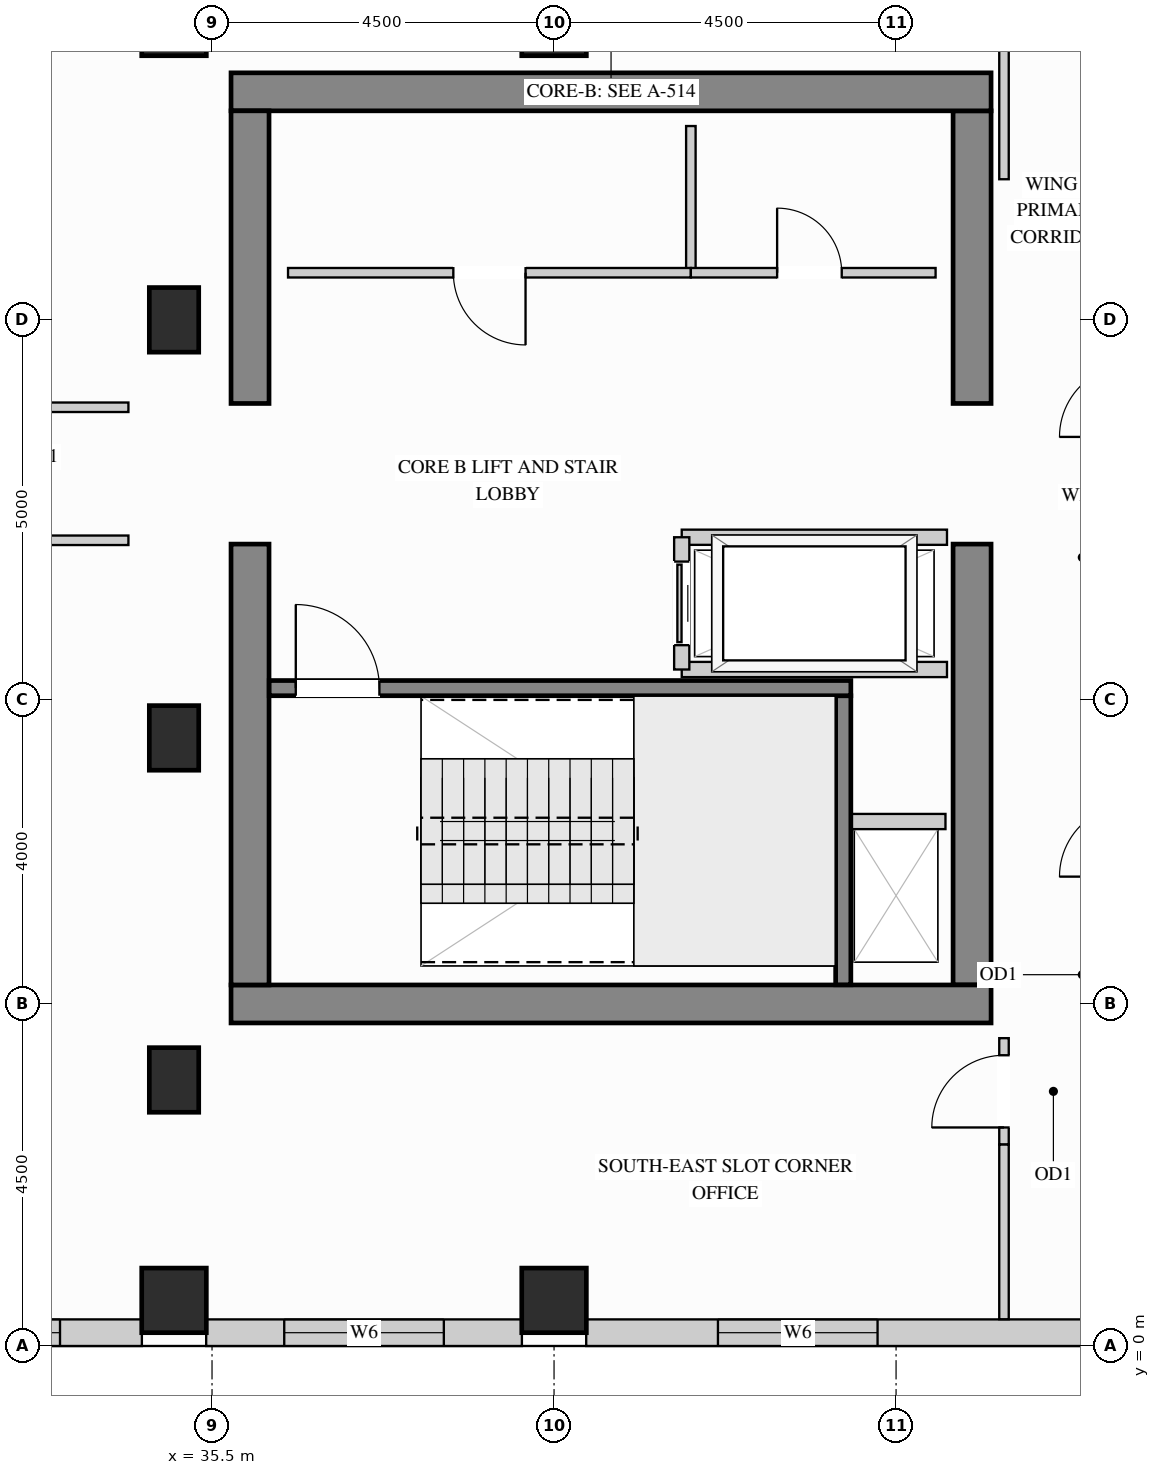
"""IFC4 building model, lengths in metres.
Left out: names, types, materials, properties, quantities, classifications, styles, units other than length and angle.
Written with IfcOpenShell. Run it as: python <this file> out.ifc"""

import sys

from ifc_helpers import new_model, si_unit, direction, frame, frame_2d, origin, origin_2d, place, context, subcontext, project, spatial, rectangle, extrude, source, transform, mapped, element, fill, save


model = new_model("IFC4")
c1 = context("Model", 3, precision=1e-05, world=origin(), true_north=direction((0.0, 1.0)))
c2 = subcontext(c1, "Body", "Model", "MODEL_VIEW")
j1 = project(units=[si_unit("LENGTHUNIT", "METRE"), si_unit("PLANEANGLEUNIT", "RADIAN")], contexts=[c1])
p1 = place(None, origin())
s1 = spatial("IfcSite", under=j1, at=p1, CompositionType="ELEMENT")
p2 = place(p1, origin())
s2 = spatial("IfcBuilding", under=s1, at=p2, CompositionType="ELEMENT")
p3 = place(p2, frame((0.0, 0.0, 252.0)))
s3 = spatial("IfcBuildingStorey", under=s2, at=p3, CompositionType="ELEMENT", Elevation=252.0)
m1 = source(origin(), c2, "Body", "SweptSolid", [
    extrude(rectangle(XDim=0.65, YDim=0.85, at=origin_2d()), origin(), (0.0, 0.0, 1.0), 3.4),
])
for number, where, z_axis, x_axis in (
    (1, (35.0, 13.5, 0.0), (0.0, 0.0, 1.0), (1.0, 0.0, 0.0)),
    (2, (35.0, 3.5, 0.0), (0.0, 0.0, 1.0), (1.0, 0.0, 0.0)),
    (3, (35.0, 8.0, 0.0), (0.0, 0.0, 1.0), (1.0, 0.0, 0.0)),
):
    element("IfcColumn", number, at=place(p3, frame(where, z_axis=z_axis, x_axis=x_axis)), inside=s3, PredefinedType="COLUMN", context=c2, shape_type="MappedRepresentation", body=[
        mapped(m1, transform((0.0, 0.0, 0.0), x_axis=(1.0, 0.0, 0.0), y_axis=(0.0, 1.0, 0.0), z_axis=(0.0, 0.0, 1.0))),
    ])
m2 = source(origin(), c2, "Body", "SweptSolid", [
    extrude(rectangle(XDim=0.85, YDim=0.85, at=origin_2d()), origin(), (0.0, 0.0, 1.0), 3.4),
])
for number, where, z_axis, x_axis in (
    (4, (35.0, 17.4, 0.0), (0.0, 0.0, 1.0), (1.0, 0.0, 0.0)),
    (5, (40.0, 17.4, 0.0), (0.0, 0.0, 1.0), (1.0, 0.0, 0.0)),
    (6, (35.0, 0.6, 0.0), (0.0, 0.0, 1.0), (1.0, 0.0, 0.0)),
    (7, (40.0, 0.6, 0.0), (0.0, 0.0, 1.0), (1.0, 0.0, 0.0)),
):
    element("IfcColumn", number, at=place(p3, frame(where, z_axis=z_axis, x_axis=x_axis)), inside=s3, PredefinedType="COLUMN", context=c2, shape_type="MappedRepresentation", body=[
        mapped(m2, transform((0.0, 0.0, 0.0), x_axis=(1.0, 0.0, 0.0), y_axis=(0.0, 1.0, 0.0), z_axis=(0.0, 0.0, 1.0))),
    ])
m3 = source(origin(), c2, "Body", "SweptSolid", [
    extrude(rectangle(XDim=5.8, YDim=0.5, at=frame_2d((2.9, 0.0))), origin(), (0.0, 0.0, 1.0), 3.4),
])
p4 = place(p3, frame((45.5, 4.75, 0.0), z_axis=(0.0, 0.0, 1.0), x_axis=(0.0, 1.0, 0.0)))
e8 = element("IfcWall", 8, at=p4, inside=s3, PredefinedType="SHEAR", context=c2, shape_type="MappedRepresentation", body=[
    mapped(m3, transform((0.0, 0.0, 0.0), x_axis=(1.0, 0.0, 0.0), y_axis=(0.0, 1.0, 0.0), z_axis=(0.0, 0.0, 1.0))),
])
m4 = source(origin(), c2, "Body", "SweptSolid", [
    extrude(rectangle(XDim=3.85, YDim=0.5, at=frame_2d((1.925, 0.0))), origin(), (0.0, 0.0, 1.0), 3.4),
])
p5 = place(p3, frame((45.5, 12.4, 0.0), z_axis=(0.0, 0.0, 1.0), x_axis=(0.0, 1.0, 0.0)))
e9 = element("IfcWall", 9, at=p5, inside=s3, PredefinedType="SHEAR", context=c2, shape_type="MappedRepresentation", body=[
    mapped(m4, transform((0.0, 0.0, 0.0), x_axis=(1.0, 0.0, 0.0), y_axis=(0.0, 1.0, 0.0), z_axis=(0.0, 0.0, 1.0))),
])
m5 = source(origin(), c2, "Body", "SweptSolid", [
    extrude(rectangle(XDim=10.0, YDim=0.5, at=frame_2d((5.0, 0.0))), origin(), (0.0, 0.0, 1.0), 3.4),
])
for number, where, z_axis, x_axis in (
    (10, (35.75, 16.5, 0.0), (0.0, 0.0, 1.0), (1.0, 0.0, 0.0)),
    (11, (35.75, 4.5, 0.0), (0.0, 0.0, 1.0), (1.0, 0.0, 0.0)),
):
    element("IfcWall", number, at=place(p3, frame(where, z_axis=z_axis, x_axis=x_axis)), inside=s3, PredefinedType="SHEAR", context=c2, shape_type="MappedRepresentation", body=[
        mapped(m5, transform((0.0, 0.0, 0.0), x_axis=(1.0, 0.0, 0.0), y_axis=(0.0, 1.0, 0.0), z_axis=(0.0, 0.0, 1.0))),
    ])
p6 = place(p3, frame((36.0, 4.75, 0.0), z_axis=(0.0, 0.0, 1.0), x_axis=(0.0, 1.0, 0.0)))
e12 = element("IfcWall", 12, at=p6, inside=s3, PredefinedType="SHEAR", context=c2, shape_type="MappedRepresentation", body=[
    mapped(m3, transform((0.0, 0.0, 0.0), x_axis=(1.0, 0.0, 0.0), y_axis=(0.0, 1.0, 0.0), z_axis=(0.0, 0.0, 1.0))),
])
p7 = place(p3, frame((36.0, 12.4, 0.0), z_axis=(0.0, 0.0, 1.0), x_axis=(0.0, 1.0, 0.0)))
e13 = element("IfcWall", 13, at=p7, inside=s3, PredefinedType="SHEAR", context=c2, shape_type="MappedRepresentation", body=[
    mapped(m4, transform((0.0, 0.0, 0.0), x_axis=(1.0, 0.0, 0.0), y_axis=(0.0, 1.0, 0.0), z_axis=(0.0, 0.0, 1.0))),
])
p8 = place(p3, frame((30.923, 0.175, 0.0), z_axis=(0.0, 0.0, 1.0), x_axis=(1.0, 0.0, 0.0)))
e14 = element("IfcWall", 14, at=p8, inside=s3, PredefinedType="SOLIDWALL", context=c2, shape_type="SweptSolid", body=[
    extrude(rectangle(XDim=3.654, YDim=0.35, at=frame_2d((1.827, 0.0))), origin(), (0.0, 0.0, 1.0), 3.385),
])
p9 = place(p8, frame((1.077, 0.0, 0.78)))
e15 = element("IfcOpeningElement", 15, at=p9, cuts=e14, PredefinedType="OPENING", context=c2, shape_type="SweptSolid", body=[
    extrude(rectangle(XDim=1.5, YDim=2.0, at=frame_2d((0.75, 1.0))), frame((0.0, 0.185, 0.0), z_axis=(0.0, -1.0, 0.0), x_axis=(1.0, 0.0, 0.0)), (0.0, 0.0, 1.0), 0.37),
])
p10 = place(p3, frame((35.423, 0.175, 0.0), z_axis=(0.0, 0.0, 1.0), x_axis=(1.0, 0.0, 0.0)))
e16 = element("IfcWall", 16, at=p10, inside=s3, PredefinedType="SOLIDWALL", context=c2, shape_type="SweptSolid", body=[
    extrude(rectangle(XDim=4.154, YDim=0.35, at=frame_2d((2.077, 0.0))), origin(), (0.0, 0.0, 1.0), 3.385),
])
p11 = place(p10, frame((1.027, 0.0, 0.78)))
e17 = element("IfcOpeningElement", 17, at=p11, cuts=e16, PredefinedType="OPENING", context=c2, shape_type="SweptSolid", body=[
    extrude(rectangle(XDim=2.1, YDim=2.25, at=frame_2d((1.05, 1.125))), frame((0.0, 0.185, 0.0), z_axis=(0.0, -1.0, 0.0), x_axis=(1.0, 0.0, 0.0)), (0.0, 0.0, 1.0), 0.37),
])
p12 = place(p3, frame((40.423, 0.175, 0.0), z_axis=(0.0, 0.0, 1.0), x_axis=(1.0, 0.0, 0.0)))
e18 = element("IfcWall", 18, at=p12, inside=s3, PredefinedType="SOLIDWALL", context=c2, shape_type="SweptSolid", body=[
    extrude(rectangle(XDim=7.077, YDim=0.35, at=frame_2d((3.539, 0.0))), origin(), (0.0, 0.0, 1.0), 3.385),
])
p13 = place(p12, frame((1.733, 0.0, 0.78)))
e19 = element("IfcOpeningElement", 19, at=p13, cuts=e18, PredefinedType="OPENING", context=c2, shape_type="SweptSolid", body=[
    extrude(rectangle(XDim=2.1, YDim=2.25, at=frame_2d((1.05, 1.125))), frame((0.0, 0.185, 0.0), z_axis=(0.0, -1.0, 0.0), x_axis=(1.0, 0.0, 0.0)), (0.0, 0.0, 1.0), 0.37),
])
m6 = source(origin(), c2, "Body", "SweptSolid", [
    extrude(rectangle(XDim=1.93, YDim=0.125, at=frame_2d((0.965, 0.0))), origin(), (0.0, 0.0, 1.0), 3.385),
])
p14 = place(p3, frame((41.8, 14.12, 0.0), z_axis=(0.0, 0.0, 1.0), x_axis=(0.0, 1.0, 0.0)))
e20 = element("IfcWall", 20, at=p14, inside=s3, PredefinedType="PARTITIONING", context=c2, shape_type="MappedRepresentation", body=[
    mapped(m6, transform((0.0, 0.0, 0.0), x_axis=(1.0, 0.0, 0.0), y_axis=(0.0, 1.0, 0.0), z_axis=(0.0, 0.0, 1.0))),
])
p15 = place(p3, frame((36.5, 14.12, 0.0), z_axis=(0.0, 0.0, 1.0), x_axis=(1.0, 0.0, 0.0)))
e21 = element("IfcWall", 21, at=p15, inside=s3, PredefinedType="PARTITIONING", context=c2, shape_type="SweptSolid", body=[
    extrude(rectangle(XDim=5.3, YDim=0.125, at=frame_2d((2.65, 0.0))), origin(), (0.0, 0.0, 1.0), 3.385),
])
p16 = place(p15, frame((2.175, 0.0, 0.0)))
e22 = element("IfcOpeningElement", 22, at=p16, cuts=e21, PredefinedType="OPENING", context=c2, shape_type="SweptSolid", body=[
    extrude(rectangle(XDim=0.95, YDim=2.15, at=frame_2d((0.475, 1.075))), frame((0.0, 0.073, 0.0), z_axis=(0.0, -1.0, 0.0), x_axis=(1.0, 0.0, 0.0)), (0.0, 0.0, 1.0), 0.145),
])
p17 = place(p3, frame((41.8, 14.12, 0.0), z_axis=(0.0, 0.0, 1.0), x_axis=(1.0, 0.0, 0.0)))
e23 = element("IfcWall", 23, at=p17, inside=s3, PredefinedType="PARTITIONING", context=c2, shape_type="SweptSolid", body=[
    extrude(rectangle(XDim=3.22, YDim=0.125, at=frame_2d((1.61, 0.0))), origin(), (0.0, 0.0, 1.0), 3.385),
])
p18 = place(p17, frame((1.135, 0.0, 0.0)))
e24 = element("IfcOpeningElement", 24, at=p18, cuts=e23, PredefinedType="OPENING", context=c2, shape_type="SweptSolid", body=[
    extrude(rectangle(XDim=0.85, YDim=2.1, at=frame_2d((0.425, 1.05))), frame((0.0, 0.073, 0.0), z_axis=(0.0, -1.0, 0.0), x_axis=(1.0, 0.0, 0.0)), (0.0, 0.0, 1.0), 0.145),
])
m7 = source(origin(), c2, "Body", "SweptSolid", [
    extrude(rectangle(XDim=2.298, YDim=0.125, at=frame_2d((1.149, 0.0))), origin(), (0.0, 0.0, 1.0), 3.385),
])
p19 = place(p3, frame((45.92, 15.35, 0.0), z_axis=(0.0, 0.0, 1.0), x_axis=(0.0, 1.0, 0.0)))
e25 = element("IfcWall", 25, at=p19, inside=s3, PredefinedType="PARTITIONING", context=c2, shape_type="MappedRepresentation", body=[
    mapped(m7, transform((0.0, 0.0, 0.0), x_axis=(1.0, 0.0, 0.0), y_axis=(0.0, 1.0, 0.0), z_axis=(0.0, 0.0, 1.0))),
])
p20 = place(p3, frame((45.92, 2.65, 0.0), z_axis=(0.0, 0.0, 1.0), x_axis=(0.0, 1.0, 0.0)))
e26 = element("IfcWall", 26, at=p20, inside=s3, PredefinedType="PARTITIONING", context=c2, shape_type="SweptSolid", body=[
    extrude(rectangle(XDim=1.4, YDim=0.125, at=frame_2d((0.7, 0.0))), origin(), (0.0, 0.0, 1.0), 3.385),
])
p21 = place(p20, frame((0.225, 0.0, 0.0)))
e27 = element("IfcOpeningElement", 27, at=p21, cuts=e26, PredefinedType="OPENING", context=c2, shape_type="SweptSolid", body=[
    extrude(rectangle(XDim=0.95, YDim=2.15, at=frame_2d((0.475, 1.075))), frame((0.0, 0.073, 0.0), z_axis=(0.0, -1.0, 0.0), x_axis=(1.0, 0.0, 0.0)), (0.0, 0.0, 1.0), 0.145),
])
p22 = place(p3, frame((45.92, 0.352, 0.0), z_axis=(0.0, 0.0, 1.0), x_axis=(0.0, 1.0, 0.0)))
e28 = element("IfcWall", 28, at=p22, inside=s3, PredefinedType="PARTITIONING", context=c2, shape_type="MappedRepresentation", body=[
    mapped(m7, transform((0.0, 0.0, 0.0), x_axis=(1.0, 0.0, 0.0), y_axis=(0.0, 1.0, 0.0), z_axis=(0.0, 0.0, 1.0))),
])
p23 = place(p3, frame((29.85, 12.35, 0.0), z_axis=(0.0, 0.0, 1.0), x_axis=(1.0, 0.0, 0.0)))
e29 = element("IfcWall", 29, at=p23, inside=s3, PredefinedType="PARTITIONING", context=c2, shape_type="SweptSolid", body=[
    extrude(rectangle(XDim=4.55, YDim=0.125, at=frame_2d((2.275, 0.0))), origin(), (0.0, 0.0, 1.0), 3.385),
])
p24 = place(p23, frame((1.8, 0.0, 0.0)))
e30 = element("IfcOpeningElement", 30, at=p24, cuts=e29, PredefinedType="OPENING", context=c2, shape_type="SweptSolid", body=[
    extrude(rectangle(XDim=0.95, YDim=2.15, at=frame_2d((0.475, 1.075))), frame((0.0, 0.073, 0.0), z_axis=(0.0, -1.0, 0.0), x_axis=(1.0, 0.0, 0.0)), (0.0, 0.0, 1.0), 0.145),
])
p25 = place(p3, frame((29.85, 10.6, 0.0), z_axis=(0.0, 0.0, 1.0), x_axis=(1.0, 0.0, 0.0)))
e31 = element("IfcWall", 31, at=p25, inside=s3, PredefinedType="PARTITIONING", context=c2, shape_type="SweptSolid", body=[
    extrude(rectangle(XDim=4.55, YDim=0.125, at=frame_2d((2.275, 0.0))), origin(), (0.0, 0.0, 1.0), 3.385),
])
p26 = place(p25, frame((1.8, 0.0, 0.0)))
e32 = element("IfcOpeningElement", 32, at=p26, cuts=e31, PredefinedType="OPENING", context=c2, shape_type="SweptSolid", body=[
    extrude(rectangle(XDim=0.95, YDim=2.15, at=frame_2d((0.475, 1.075))), frame((0.0, 0.073, 0.0), z_axis=(0.0, -1.0, 0.0), x_axis=(1.0, 0.0, 0.0)), (0.0, 0.0, 1.0), 0.145),
])
m8 = source(origin(), c2, "Body", "SweptSolid", [
    extrude(rectangle(XDim=1.3, YDim=0.2, at=frame_2d((0.65, 0.0))), origin(), (0.0, 0.0, 1.0), 3.385),
])
p27 = place(p3, frame((43.85, 6.9, 0.0), z_axis=(0.0, 0.0, 1.0), x_axis=(1.0, 0.0, 0.0)))
e33 = element("IfcWall", 33, at=p27, inside=s3, PredefinedType="PARTITIONING", context=c2, shape_type="MappedRepresentation", body=[
    mapped(m8, transform((0.0, 0.0, 0.0), x_axis=(1.0, 0.0, 0.0), y_axis=(0.0, 1.0, 0.0), z_axis=(0.0, 0.0, 1.0))),
])
m9 = source(origin(), c2, "Body", "SweptSolid", [
    extrude(rectangle(XDim=3.49, YDim=0.2, at=frame_2d((1.745, 0.0))), origin(), (0.0, 0.0, 1.0), 3.385),
])
for number, where, z_axis, x_axis in (
    (34, (41.68, 10.64, 0.0), (0.0, 0.0, 1.0), (1.0, 0.0, 0.0)),
    (35, (41.68, 8.9, 0.0), (0.0, 0.0, 1.0), (1.0, 0.0, 0.0)),
):
    element("IfcWall", number, at=place(p3, frame(where, z_axis=z_axis, x_axis=x_axis)), inside=s3, PredefinedType="PARTITIONING", context=c2, shape_type="MappedRepresentation", body=[
        mapped(m9, transform((0.0, 0.0, 0.0), x_axis=(1.0, 0.0, 0.0), y_axis=(0.0, 1.0, 0.0), z_axis=(0.0, 0.0, 1.0))),
    ])
p28 = place(p3, frame((41.68, 8.9, 0.0), z_axis=(0.0, 0.0, 1.0), x_axis=(0.0, 1.0, 0.0)))
e36 = element("IfcWall", 36, at=p28, inside=s3, PredefinedType="PARTITIONING", context=c2, shape_type="SweptSolid", body=[
    extrude(rectangle(XDim=1.74, YDim=0.2, at=frame_2d((0.87, 0.0))), origin(), (0.0, 0.0, 1.0), 3.385),
])
p29 = place(p28, frame((0.32, 0.0, 0.0)))
e37 = element("IfcOpeningElement", 37, at=p29, cuts=e36, PredefinedType="OPENING", context=c2, shape_type="SweptSolid", body=[
    extrude(rectangle(XDim=1.1, YDim=2.2, at=frame_2d((0.55, 1.1))), frame((0.0, 0.11, 0.0), z_axis=(0.0, -1.0, 0.0), x_axis=(1.0, 0.0, 0.0)), (0.0, 0.0, 1.0), 0.22),
])
m10 = source(origin(), c2, "Body", "SweptSolid", [
    extrude(rectangle(XDim=3.803, YDim=0.2, at=frame_2d((1.901, 0.0))), origin(), (0.0, 0.0, 1.0), 3.4),
])
p30 = place(p3, frame((43.805, 4.752, 0.0), z_axis=(0.0, 0.0, 1.0), x_axis=(0.0, 1.0, 0.0)))
e38 = element("IfcWall", 38, at=p30, inside=s3, PredefinedType="SHEAR", context=c2, shape_type="MappedRepresentation", body=[
    mapped(m10, transform((0.0, 0.0, 0.0), x_axis=(1.0, 0.0, 0.0), y_axis=(0.0, 1.0, 0.0), z_axis=(0.0, 0.0, 1.0))),
])
p31 = place(p3, frame((36.252, 8.655, 0.0), z_axis=(0.0, 0.0, 1.0), x_axis=(1.0, 0.0, 0.0)))
e39 = element("IfcWall", 39, at=p31, inside=s3, PredefinedType="SHEAR", context=c2, shape_type="SweptSolid", body=[
    extrude(rectangle(XDim=7.653, YDim=0.2, at=frame_2d((3.827, 0.0))), origin(), (0.0, 0.0, 1.0), 3.4),
])
p32 = place(p31, frame((0.35, 0.0, 0.0)))
e40 = element("IfcOpeningElement", 40, at=p32, cuts=e39, PredefinedType="OPENING", context=c2, shape_type="SweptSolid", body=[
    extrude(rectangle(XDim=1.1, YDim=2.15, at=frame_2d((0.55, 1.075))), frame((0.0, 0.11, 0.0), z_axis=(0.0, -1.0, 0.0), x_axis=(1.0, 0.0, 0.0)), (0.0, 0.0, 1.0), 0.22),
])
m11 = source(origin(), c2, "Body", "SweptSolid", [
    extrude(rectangle(XDim=1.1, YDim=2.2, at=frame_2d((0.55, 1.1))), frame((0.0, 0.025, 0.0), z_axis=(0.0, -1.0, 0.0), x_axis=(1.0, 0.0, 0.0)), (0.0, 0.0, 1.0), 0.05),
])
p33 = place(p29, origin())
e41 = element("IfcDoor", 41, at=p33, inside=s3, OperationType="SLIDING_TO_LEFT", PredefinedType="DOOR", context=c2, shape_type="MappedRepresentation", body=[
    mapped(m11, transform((0.0, 0.0, 0.0), x_axis=(1.0, 0.0, 0.0), y_axis=(0.0, 1.0, 0.0), z_axis=(0.0, 0.0, 1.0))),
])
fill(e37, e41)
m12 = source(origin(), c2, "Body", "SweptSolid", [
    extrude(rectangle(XDim=0.95, YDim=2.15, at=frame_2d((0.475, 1.075))), frame((0.0, 0.025, 0.0), z_axis=(0.0, -1.0, 0.0), x_axis=(1.0, 0.0, 0.0)), (0.0, 0.0, 1.0), 0.05),
])
p34 = place(p16, origin())
e42 = element("IfcDoor", 42, at=p34, inside=s3, OperationType="SINGLE_SWING_RIGHT", PredefinedType="DOOR", context=c2, shape_type="MappedRepresentation", body=[
    mapped(m12, transform((0.0, 0.0, 0.0), x_axis=(1.0, 0.0, 0.0), y_axis=(0.0, 1.0, 0.0), z_axis=(0.0, 0.0, 1.0))),
])
fill(e22, e42)
p35 = place(p21, origin())
e43 = element("IfcDoor", 43, at=p35, inside=s3, OperationType="SINGLE_SWING_LEFT", PredefinedType="DOOR", context=c2, shape_type="MappedRepresentation", body=[
    mapped(m12, transform((0.0, 0.0, 0.0), x_axis=(1.0, 0.0, 0.0), y_axis=(0.0, 1.0, 0.0), z_axis=(0.0, 0.0, 1.0))),
])
fill(e27, e43)
m13 = source(origin(), c2, "Body", "SweptSolid", [
    extrude(rectangle(XDim=0.85, YDim=2.1, at=frame_2d((0.425, 1.05))), frame((0.0, 0.025, 0.0), z_axis=(0.0, -1.0, 0.0), x_axis=(1.0, 0.0, 0.0)), (0.0, 0.0, 1.0), 0.05),
])
p36 = place(p18, origin())
e44 = element("IfcDoor", 44, at=p36, inside=s3, OperationType="SINGLE_SWING_LEFT", PredefinedType="DOOR", context=c2, shape_type="MappedRepresentation", body=[
    mapped(m13, transform((0.0, 0.0, 0.0), x_axis=(1.0, 0.0, 0.0), y_axis=(0.0, 1.0, 0.0), z_axis=(0.0, 0.0, 1.0))),
])
fill(e24, e44)
m14 = source(origin(), c2, "Body", "SweptSolid", [
    extrude(rectangle(XDim=1.1, YDim=2.15, at=frame_2d((0.55, 1.075))), frame((0.0, 0.025, 0.0), z_axis=(0.0, -1.0, 0.0), x_axis=(1.0, 0.0, 0.0)), (0.0, 0.0, 1.0), 0.05),
])
p37 = place(p32, origin())
e45 = element("IfcDoor", 45, at=p37, inside=s3, OperationType="SINGLE_SWING_LEFT", PredefinedType="DOOR", context=c2, shape_type="MappedRepresentation", body=[
    mapped(m14, transform((0.0, 0.0, 0.0), x_axis=(1.0, 0.0, 0.0), y_axis=(0.0, 1.0, 0.0), z_axis=(0.0, 0.0, 1.0))),
])
fill(e40, e45)
m15 = source(origin(), c2, "Body", "SweptSolid", [
    extrude(rectangle(XDim=1.5, YDim=2.0, at=frame_2d((0.75, 1.0))), frame((0.0, 0.03, 0.0), z_axis=(0.0, -1.0, 0.0), x_axis=(1.0, 0.0, 0.0)), (0.0, 0.0, 1.0), 0.06),
])
p38 = place(p9, origin())
e46 = element("IfcWindow", 46, at=p38, inside=s3, PartitioningType="SINGLE_PANEL", PredefinedType="WINDOW", context=c2, shape_type="MappedRepresentation", body=[
    mapped(m15, transform((0.0, 0.0, 0.0), x_axis=(1.0, 0.0, 0.0), y_axis=(0.0, 1.0, 0.0), z_axis=(0.0, 0.0, 1.0))),
])
fill(e15, e46)
m16 = source(origin(), c2, "Body", "SweptSolid", [
    extrude(rectangle(XDim=2.1, YDim=2.25, at=frame_2d((1.05, 1.125))), frame((0.0, 0.03, 0.0), z_axis=(0.0, -1.0, 0.0), x_axis=(1.0, 0.0, 0.0)), (0.0, 0.0, 1.0), 0.06),
])
p39 = place(p11, origin())
e47 = element("IfcWindow", 47, at=p39, inside=s3, PartitioningType="SINGLE_PANEL", PredefinedType="WINDOW", context=c2, shape_type="MappedRepresentation", body=[
    mapped(m16, transform((0.0, 0.0, 0.0), x_axis=(1.0, 0.0, 0.0), y_axis=(0.0, 1.0, 0.0), z_axis=(0.0, 0.0, 1.0))),
])
fill(e17, e47)
p40 = place(p13, origin())
e48 = element("IfcWindow", 48, at=p40, inside=s3, PartitioningType="SINGLE_PANEL", PredefinedType="WINDOW", context=c2, shape_type="MappedRepresentation", body=[
    mapped(m16, transform((0.0, 0.0, 0.0), x_axis=(1.0, 0.0, 0.0), y_axis=(0.0, 1.0, 0.0), z_axis=(0.0, 0.0, 1.0))),
])
fill(e19, e48)
save(model, sys.argv[1])
